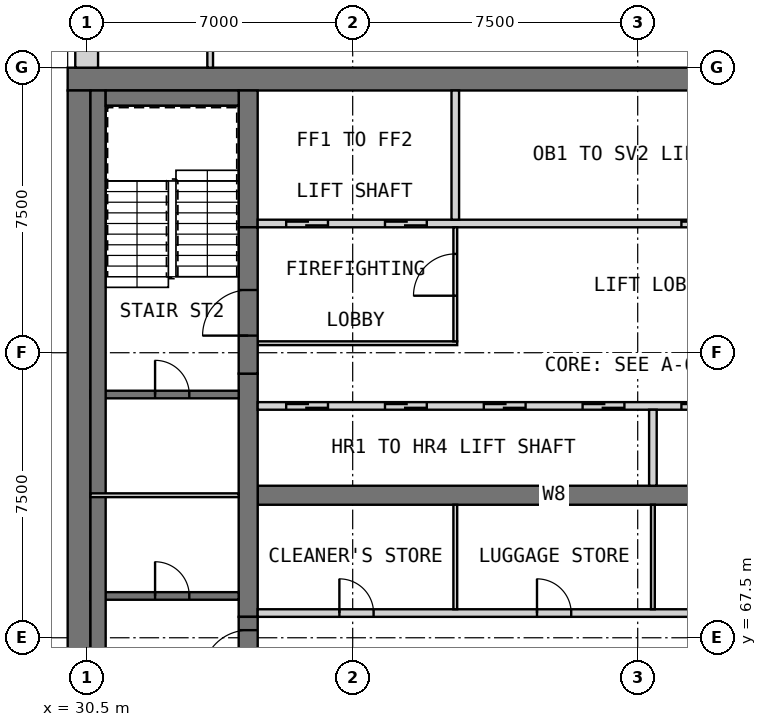
"""IFC4 building model, lengths in metres.
Left out: names, types, materials, properties, quantities, classifications, styles, units other than length and angle.
Written with IfcOpenShell. Run it as: python <this file> out.ifc"""

import sys

from ifc_helpers import new_model, si_unit, direction, frame, frame_2d, origin, place, context, subcontext, project, spatial, rectangle, extrude, element, fill, save


model = new_model("IFC4")
c1 = context("Model", 3, precision=1e-05, world=origin(), true_north=direction((0.0, 1.0)))
c2 = subcontext(c1, "Body", "Model", "MODEL_VIEW")
j1 = project(units=[si_unit("LENGTHUNIT", "METRE"), si_unit("PLANEANGLEUNIT", "RADIAN")], contexts=[c1])
p1 = place(None, origin())
s1 = spatial("IfcSite", under=j1, at=p1, CompositionType="ELEMENT")
p2 = place(p1, origin())
s2 = spatial("IfcBuilding", under=s1, at=p2, CompositionType="ELEMENT")
p3 = place(p2, frame((0.0, 0.0, 254.7)))
s3 = spatial("IfcBuildingStorey", under=s2, at=p3, CompositionType="ELEMENT", Elevation=254.7)
p4 = place(p3, frame((30.0, 82.2, 0.0), z_axis=(0.0, 0.0, 1.0), x_axis=(1.0, 0.0, 0.0)))
e1 = element("IfcWall", 1, at=p4, inside=s3, PredefinedType="SHEAR", context=c2, shape_type="SweptSolid", body=[
    extrude(rectangle(XDim=30.0, YDim=0.6, at=frame_2d((15.0, 0.0))), origin(), (0.0, 0.0, 1.0), 3.5),
])
p5 = place(p3, frame((30.3, 60.6, 0.0), z_axis=(0.0, 0.0, 1.0), x_axis=(0.0, 1.0, 0.0)))
e2 = element("IfcWall", 2, at=p5, inside=s3, PredefinedType="SHEAR", context=c2, shape_type="SweptSolid", body=[
    extrude(rectangle(XDim=21.3, YDim=0.6, at=frame_2d((10.65, 0.0))), origin(), (0.0, 0.0, 1.0), 3.5),
])
p6 = place(p3, frame((35.0, 71.25, 0.0), z_axis=(0.0, 0.0, 1.0), x_axis=(1.0, 0.0, 0.0)))
e3 = element("IfcWall", 3, at=p6, inside=s3, PredefinedType="SHEAR", context=c2, shape_type="SweptSolid", body=[
    extrude(rectangle(XDim=15.6, YDim=0.5, at=frame_2d((7.8, 0.0))), origin(), (0.0, 0.0, 1.0), 3.5),
])
p7 = place(p3, frame((34.75, 68.05, 0.0), z_axis=(0.0, 0.0, 1.0), x_axis=(0.0, 1.0, 0.0)))
e4 = element("IfcWall", 4, at=p7, inside=s3, PredefinedType="SHEAR", context=c2, shape_type="SweptSolid", body=[
    extrude(rectangle(XDim=6.4, YDim=0.5, at=frame_2d((3.2, 0.0))), origin(), (0.0, 0.0, 1.0), 3.5),
])
p8 = place(p3, frame((34.75, 78.3, 0.0), z_axis=(0.0, 0.0, 1.0), x_axis=(0.0, 1.0, 0.0)))
e5 = element("IfcWall", 5, at=p8, inside=s3, PredefinedType="SHEAR", context=c2, shape_type="SweptSolid", body=[
    extrude(rectangle(XDim=3.6, YDim=0.5, at=frame_2d((1.8, 0.0))), origin(), (0.0, 0.0, 1.0), 3.5),
])
p9 = place(p2, frame((0.0, 0.0, 34.0)))
s4 = spatial("IfcBuildingStorey", under=s2, at=p9, CompositionType="ELEMENT", Elevation=34.0)
for number, where, z_axis, x_axis in (
    (6, (29.7, 70.8, 0.0), (0.0, 0.0, 1.0), (0.0, 1.0, 0.0)),
    (7, (29.7, 75.675, 0.0), (0.0, 0.0, 1.0), (0.0, 1.0, 0.0)),
    (8, (29.7, 80.55, 0.0), (0.0, 0.0, 1.0), (0.0, 1.0, 0.0)),
):
    element("IfcWall", number, at=place(p9, frame(where, z_axis=z_axis, x_axis=x_axis)), inside=s4, PredefinedType="SOLIDWALL", context=c2, shape_type="SweptSolid", body=[
        extrude(rectangle(XDim=0.9, YDim=0.6, at=frame_2d((0.45, 0.0))), origin(), (0.0, 0.0, 1.0), 286.2),
    ])
p10 = place(p3, frame((30.5, 89.5, 0.0), z_axis=(0.0, 0.0, 1.0), x_axis=(0.0, -1.0, 0.0)))
e9 = element("IfcWall", 9, at=p10, inside=s3, PredefinedType="SOLIDWALL", context=c2, shape_type="SweptSolid", body=[
    extrude(rectangle(XDim=7.0, YDim=0.6, at=frame_2d((3.5, 0.0))), origin(), (0.0, 0.0, 1.0), 3.1),
])
p11 = place(p10, frame((3.925, 0.0, 0.8)))
e10 = element("IfcOpeningElement", 10, at=p11, cuts=e9, PredefinedType="OPENING", context=c2, shape_type="SweptSolid", body=[
    extrude(rectangle(XDim=2.4, YDim=1.8, at=frame_2d((1.2, 0.9))), frame((0.0, 0.31, 0.0), z_axis=(0.0, -1.0, 0.0), x_axis=(1.0, 0.0, 0.0)), (0.0, 0.0, 1.0), 0.62),
])
p12 = place(p10, frame((0.425, 0.0, 0.8)))
e11 = element("IfcOpeningElement", 11, at=p12, cuts=e9, PredefinedType="OPENING", context=c2, shape_type="SweptSolid", body=[
    extrude(rectangle(XDim=2.4, YDim=1.8, at=frame_2d((1.2, 0.9))), frame((0.0, 0.31, 0.0), z_axis=(0.0, -1.0, 0.0), x_axis=(1.0, 0.0, 0.0)), (0.0, 0.0, 1.0), 0.62),
])
p13 = place(p3, frame((35.0, 68.15, 0.0), z_axis=(0.0, 0.0, 1.0), x_axis=(1.0, 0.0, 0.0)))
e12 = element("IfcWall", 12, at=p13, inside=s3, PredefinedType="PARTITIONING", context=c2, shape_type="SweptSolid", body=[
    extrude(rectangle(XDim=15.6, YDim=0.2, at=frame_2d((7.8, 0.0))), origin(), (0.0, 0.0, 1.0), 3.09),
])
p14 = place(p13, frame((2.15, 0.0, 0.0)))
e13 = element("IfcOpeningElement", 13, at=p14, cuts=e12, PredefinedType="OPENING", context=c2, shape_type="SweptSolid", body=[
    extrude(rectangle(XDim=0.9, YDim=2.1, at=frame_2d((0.45, 1.05))), frame((0.0, 0.11, 0.0), z_axis=(0.0, -1.0, 0.0), x_axis=(1.0, 0.0, 0.0)), (0.0, 0.0, 1.0), 0.22),
])
p15 = place(p13, frame((7.35, 0.0, 0.0)))
e14 = element("IfcOpeningElement", 14, at=p15, cuts=e12, PredefinedType="OPENING", context=c2, shape_type="SweptSolid", body=[
    extrude(rectangle(XDim=0.9, YDim=2.1, at=frame_2d((0.45, 1.05))), frame((0.0, 0.11, 0.0), z_axis=(0.0, -1.0, 0.0), x_axis=(1.0, 0.0, 0.0)), (0.0, 0.0, 1.0), 0.22),
])
p16 = place(p13, frame((12.55, 0.0, 0.0)))
e15 = element("IfcOpeningElement", 15, at=p16, cuts=e12, PredefinedType="OPENING", context=c2, shape_type="SweptSolid", body=[
    extrude(rectangle(XDim=0.9, YDim=2.1, at=frame_2d((0.45, 1.05))), frame((0.0, 0.11, 0.0), z_axis=(0.0, -1.0, 0.0), x_axis=(1.0, 0.0, 0.0)), (0.0, 0.0, 1.0), 0.22),
])
for number, where, z_axis, x_axis in (
    (16, (40.2, 68.25, 0.0), (0.0, 0.0, 1.0), (0.0, 1.0, 0.0)),
    (17, (45.4, 68.25, 0.0), (0.0, 0.0, 1.0), (0.0, 1.0, 0.0)),
):
    element("IfcWall", number, at=place(p3, frame(where, z_axis=z_axis, x_axis=x_axis)), inside=s3, PredefinedType="PARTITIONING", context=c2, shape_type="SweptSolid", body=[
        extrude(rectangle(XDim=2.75, YDim=0.1, at=frame_2d((1.375, 0.0))), origin(), (0.0, 0.0, 1.0), 3.09),
    ])
p17 = place(p3, frame((35.0, 73.6, 0.0), z_axis=(0.0, 0.0, 1.0), x_axis=(1.0, 0.0, 0.0)))
e18 = element("IfcWall", 18, at=p17, inside=s3, PredefinedType="SOLIDWALL", context=c2, shape_type="SweptSolid", body=[
    extrude(rectangle(XDim=15.6, YDim=0.2, at=frame_2d((7.8, 0.0))), origin(), (0.0, 0.0, 1.0), 3.5),
])
p18 = place(p17, frame((0.75, 0.0, 0.0)))
e19 = element("IfcOpeningElement", 19, at=p18, cuts=e18, PredefinedType="OPENING", context=c2, shape_type="SweptSolid", body=[
    extrude(rectangle(XDim=1.1, YDim=2.1, at=frame_2d((0.55, 1.05))), frame((0.0, 0.11, 0.0), z_axis=(0.0, -1.0, 0.0), x_axis=(1.0, 0.0, 0.0)), (0.0, 0.0, 1.0), 0.22),
])
p19 = place(p17, frame((3.35, 0.0, 0.0)))
e20 = element("IfcOpeningElement", 20, at=p19, cuts=e18, PredefinedType="OPENING", context=c2, shape_type="SweptSolid", body=[
    extrude(rectangle(XDim=1.1, YDim=2.1, at=frame_2d((0.55, 1.05))), frame((0.0, 0.11, 0.0), z_axis=(0.0, -1.0, 0.0), x_axis=(1.0, 0.0, 0.0)), (0.0, 0.0, 1.0), 0.22),
])
p20 = place(p17, frame((5.95, 0.0, 0.0)))
e21 = element("IfcOpeningElement", 21, at=p20, cuts=e18, PredefinedType="OPENING", context=c2, shape_type="SweptSolid", body=[
    extrude(rectangle(XDim=1.1, YDim=2.1, at=frame_2d((0.55, 1.05))), frame((0.0, 0.11, 0.0), z_axis=(0.0, -1.0, 0.0), x_axis=(1.0, 0.0, 0.0)), (0.0, 0.0, 1.0), 0.22),
])
p21 = place(p17, frame((8.55, 0.0, 0.0)))
e22 = element("IfcOpeningElement", 22, at=p21, cuts=e18, PredefinedType="OPENING", context=c2, shape_type="SweptSolid", body=[
    extrude(rectangle(XDim=1.1, YDim=2.1, at=frame_2d((0.55, 1.05))), frame((0.0, 0.11, 0.0), z_axis=(0.0, -1.0, 0.0), x_axis=(1.0, 0.0, 0.0)), (0.0, 0.0, 1.0), 0.22),
])
p22 = place(p17, frame((11.15, 0.0, 0.0)))
e23 = element("IfcOpeningElement", 23, at=p22, cuts=e18, PredefinedType="OPENING", context=c2, shape_type="SweptSolid", body=[
    extrude(rectangle(XDim=1.1, YDim=2.1, at=frame_2d((0.55, 1.05))), frame((0.0, 0.11, 0.0), z_axis=(0.0, -1.0, 0.0), x_axis=(1.0, 0.0, 0.0)), (0.0, 0.0, 1.0), 0.22),
])
p23 = place(p17, frame((13.75, 0.0, 0.0)))
e24 = element("IfcOpeningElement", 24, at=p23, cuts=e18, PredefinedType="OPENING", context=c2, shape_type="SweptSolid", body=[
    extrude(rectangle(XDim=1.1, YDim=2.1, at=frame_2d((0.55, 1.05))), frame((0.0, 0.11, 0.0), z_axis=(0.0, -1.0, 0.0), x_axis=(1.0, 0.0, 0.0)), (0.0, 0.0, 1.0), 0.22),
])
p24 = place(p3, frame((45.4, 71.5, 0.0), z_axis=(0.0, 0.0, 1.0), x_axis=(0.0, 1.0, 0.0)))
e25 = element("IfcWall", 25, at=p24, inside=s3, PredefinedType="SOLIDWALL", context=c2, shape_type="SweptSolid", body=[
    extrude(rectangle(XDim=2.0, YDim=0.2, at=frame_2d((1.0, 0.0))), origin(), (0.0, 0.0, 1.0), 3.5),
])
p25 = place(p3, frame((35.0, 78.4, 0.0), z_axis=(0.0, 0.0, 1.0), x_axis=(1.0, 0.0, 0.0)))
e26 = element("IfcWall", 26, at=p25, inside=s3, PredefinedType="SOLIDWALL", context=c2, shape_type="SweptSolid", body=[
    extrude(rectangle(XDim=15.6, YDim=0.2, at=frame_2d((7.8, 0.0))), origin(), (0.0, 0.0, 1.0), 3.5),
])
p26 = place(p25, frame((0.75, 0.0, 0.0)))
e27 = element("IfcOpeningElement", 27, at=p26, cuts=e26, PredefinedType="OPENING", context=c2, shape_type="SweptSolid", body=[
    extrude(rectangle(XDim=1.1, YDim=2.1, at=frame_2d((0.55, 1.05))), frame((0.0, 0.11, 0.0), z_axis=(0.0, -1.0, 0.0), x_axis=(1.0, 0.0, 0.0)), (0.0, 0.0, 1.0), 0.22),
])
p27 = place(p25, frame((3.35, 0.0, 0.0)))
e28 = element("IfcOpeningElement", 28, at=p27, cuts=e26, PredefinedType="OPENING", context=c2, shape_type="SweptSolid", body=[
    extrude(rectangle(XDim=1.1, YDim=2.1, at=frame_2d((0.55, 1.05))), frame((0.0, 0.11, 0.0), z_axis=(0.0, -1.0, 0.0), x_axis=(1.0, 0.0, 0.0)), (0.0, 0.0, 1.0), 0.22),
])
p28 = place(p25, frame((11.15, 0.0, 0.0)))
e29 = element("IfcOpeningElement", 29, at=p28, cuts=e26, PredefinedType="OPENING", context=c2, shape_type="SweptSolid", body=[
    extrude(rectangle(XDim=1.1, YDim=2.1, at=frame_2d((0.55, 1.05))), frame((0.0, 0.11, 0.0), z_axis=(0.0, -1.0, 0.0), x_axis=(1.0, 0.0, 0.0)), (0.0, 0.0, 1.0), 0.22),
])
p29 = place(p25, frame((13.75, 0.0, 0.0)))
e30 = element("IfcOpeningElement", 30, at=p29, cuts=e26, PredefinedType="OPENING", context=c2, shape_type="SweptSolid", body=[
    extrude(rectangle(XDim=1.1, YDim=2.1, at=frame_2d((0.55, 1.05))), frame((0.0, 0.11, 0.0), z_axis=(0.0, -1.0, 0.0), x_axis=(1.0, 0.0, 0.0)), (0.0, 0.0, 1.0), 0.22),
])
p30 = place(p3, frame((40.2, 78.5, 0.0), z_axis=(0.0, 0.0, 1.0), x_axis=(0.0, 1.0, 0.0)))
e31 = element("IfcWall", 31, at=p30, inside=s3, PredefinedType="SOLIDWALL", context=c2, shape_type="SweptSolid", body=[
    extrude(rectangle(XDim=3.4, YDim=0.2, at=frame_2d((1.7, 0.0))), origin(), (0.0, 0.0, 1.0), 3.5),
])
p31 = place(p3, frame((35.0, 75.25, 0.0), z_axis=(0.0, 0.0, 1.0), x_axis=(1.0, 0.0, 0.0)))
e32 = element("IfcWall", 32, at=p31, inside=s3, PredefinedType="PARTITIONING", context=c2, shape_type="SweptSolid", body=[
    extrude(rectangle(XDim=5.25, YDim=0.1, at=frame_2d((2.625, 0.0))), origin(), (0.0, 0.0, 1.0), 3.09),
])
p32 = place(p3, frame((40.2, 75.3, 0.0), z_axis=(0.0, 0.0, 1.0), x_axis=(0.0, 1.0, 0.0)))
e33 = element("IfcWall", 33, at=p32, inside=s3, PredefinedType="PARTITIONING", context=c2, shape_type="SweptSolid", body=[
    extrude(rectangle(XDim=3.0, YDim=0.1, at=frame_2d((1.5, 0.0))), origin(), (0.0, 0.0, 1.0), 3.09),
])
p33 = place(p32, frame((1.2, 0.0, 0.0)))
e34 = element("IfcOpeningElement", 34, at=p33, cuts=e33, PredefinedType="OPENING", context=c2, shape_type="SweptSolid", body=[
    extrude(rectangle(XDim=1.1, YDim=2.1, at=frame_2d((0.55, 1.05))), frame((0.0, 0.06, 0.0), z_axis=(0.0, -1.0, 0.0), x_axis=(1.0, 0.0, 0.0)), (0.0, 0.0, 1.0), 0.12),
])
p34 = place(p3, frame((34.75, 64.2, 0.0), z_axis=(0.0, 0.0, 1.0), x_axis=(0.0, 1.0, 0.0)))
e35 = element("IfcWall", 35, at=p34, inside=s3, PredefinedType="SOLIDWALL", context=c2, shape_type="SweptSolid", body=[
    extrude(rectangle(XDim=3.85, YDim=0.5, at=frame_2d((1.925, 0.0))), origin(), (0.0, 0.0, 1.0), 2.3),
])
p35 = place(p34, frame((2.3, 0.0, 0.0)))
e36 = element("IfcOpeningElement", 36, at=p35, cuts=e35, PredefinedType="OPENING", context=c2, shape_type="SweptSolid", body=[
    extrude(rectangle(XDim=1.2, YDim=2.1, at=frame_2d((0.6, 1.05))), frame((0.0, 0.26, 0.0), z_axis=(0.0, -1.0, 0.0), x_axis=(1.0, 0.0, 0.0)), (0.0, 0.0, 1.0), 0.52),
])
p36 = place(p3, frame((34.75, 74.45, 0.0), z_axis=(0.0, 0.0, 1.0), x_axis=(0.0, 1.0, 0.0)))
e37 = element("IfcWall", 37, at=p36, inside=s3, PredefinedType="SOLIDWALL", context=c2, shape_type="SweptSolid", body=[
    extrude(rectangle(XDim=3.85, YDim=0.5, at=frame_2d((1.925, 0.0))), origin(), (0.0, 0.0, 1.0), 2.3),
])
p37 = place(p36, frame((1.0, 0.0, 0.0)))
e38 = element("IfcOpeningElement", 38, at=p37, cuts=e37, PredefinedType="OPENING", context=c2, shape_type="SweptSolid", body=[
    extrude(rectangle(XDim=1.2, YDim=2.1, at=frame_2d((0.6, 1.05))), frame((0.0, 0.26, 0.0), z_axis=(0.0, -1.0, 0.0), x_axis=(1.0, 0.0, 0.0)), (0.0, 0.0, 1.0), 0.52),
])
p38 = place(p3, frame((30.6, 68.6, 0.0), z_axis=(0.0, 0.0, 1.0), x_axis=(1.0, 0.0, 0.0)))
e39 = element("IfcWall", 39, at=p38, inside=s3, PredefinedType="SOLIDWALL", context=c2, shape_type="SweptSolid", body=[
    extrude(rectangle(XDim=3.9, YDim=0.2, at=frame_2d((1.95, 0.0))), origin(), (0.0, 0.0, 1.0), 3.09),
])
p39 = place(p38, frame((1.7, 0.0, 0.0)))
e40 = element("IfcOpeningElement", 40, at=p39, cuts=e39, PredefinedType="OPENING", context=c2, shape_type="SweptSolid", body=[
    extrude(rectangle(XDim=0.9, YDim=2.1, at=frame_2d((0.45, 1.05))), frame((0.0, 0.11, 0.0), z_axis=(0.0, -1.0, 0.0), x_axis=(1.0, 0.0, 0.0)), (0.0, 0.0, 1.0), 0.22),
])
p40 = place(p3, frame((30.6, 73.9, 0.0), z_axis=(0.0, 0.0, 1.0), x_axis=(1.0, 0.0, 0.0)))
e41 = element("IfcWall", 41, at=p40, inside=s3, PredefinedType="SOLIDWALL", context=c2, shape_type="SweptSolid", body=[
    extrude(rectangle(XDim=3.9, YDim=0.2, at=frame_2d((1.95, 0.0))), origin(), (0.0, 0.0, 1.0), 3.09),
])
p41 = place(p40, frame((1.7, 0.0, 0.0)))
e42 = element("IfcOpeningElement", 42, at=p41, cuts=e41, PredefinedType="OPENING", context=c2, shape_type="SweptSolid", body=[
    extrude(rectangle(XDim=0.9, YDim=2.1, at=frame_2d((0.45, 1.05))), frame((0.0, 0.11, 0.0), z_axis=(0.0, -1.0, 0.0), x_axis=(1.0, 0.0, 0.0)), (0.0, 0.0, 1.0), 0.22),
])
p42 = place(p3, frame((30.8, 60.6, 0.0), z_axis=(0.0, 0.0, 1.0), x_axis=(0.0, 1.0, 0.0)))
e43 = element("IfcWall", 43, at=p42, inside=s3, PredefinedType="SOLIDWALL", context=c2, shape_type="SweptSolid", body=[
    extrude(rectangle(XDim=21.3, YDim=0.4, at=frame_2d((10.65, 0.0))), origin(), (0.0, 0.0, 1.0), 3.09),
])
p43 = place(p3, frame((31.0, 81.7, 0.0), z_axis=(0.0, 0.0, 1.0), x_axis=(1.0, 0.0, 0.0)))
e44 = element("IfcWall", 44, at=p43, inside=s3, PredefinedType="SOLIDWALL", context=c2, shape_type="SweptSolid", body=[
    extrude(rectangle(XDim=3.5, YDim=0.4, at=frame_2d((1.75, 0.0))), origin(), (0.0, 0.0, 1.0), 3.09),
])
p44 = place(p3, frame((30.6, 71.25, 0.0), z_axis=(0.0, 0.0, 1.0), x_axis=(1.0, 0.0, 0.0)))
e45 = element("IfcWall", 45, at=p44, inside=s3, PredefinedType="PARTITIONING", context=c2, shape_type="SweptSolid", body=[
    extrude(rectangle(XDim=3.9, YDim=0.1, at=frame_2d((1.95, 0.0))), origin(), (0.0, 0.0, 1.0), 3.09),
])
p45 = place(p3, frame((33.75, 82.5, 0.0), z_axis=(0.0, 0.0, 1.0), x_axis=(0.0, 1.0, 0.0)))
e46 = element("IfcWall", 46, at=p45, inside=s3, PredefinedType="PARTITIONING", context=c2, shape_type="SweptSolid", body=[
    extrude(rectangle(XDim=1.725, YDim=0.15, at=frame_2d((0.863, 0.0))), origin(), (0.0, 0.0, 1.0), 3.1),
])
p46 = place(p45, frame((0.45, 0.0, 0.0)))
e47 = element("IfcOpeningElement", 47, at=p46, cuts=e46, PredefinedType="OPENING", context=c2, shape_type="SweptSolid", body=[
    extrude(rectangle(XDim=0.9, YDim=2.1, at=frame_2d((0.45, 1.05))), frame((0.0, 0.085, 0.0), z_axis=(0.0, -1.0, 0.0), x_axis=(1.0, 0.0, 0.0)), (0.0, 0.0, 1.0), 0.17),
])
p47 = place(p14, origin())
e48 = element("IfcDoor", 48, at=p47, inside=s3, OperationType="SINGLE_SWING_RIGHT", PredefinedType="DOOR", context=c2, shape_type="SweptSolid", body=[
    extrude(rectangle(XDim=0.9, YDim=2.1, at=frame_2d((0.45, 1.05))), frame((0.0, 0.025, 0.0), z_axis=(0.0, -1.0, 0.0), x_axis=(1.0, 0.0, 0.0)), (0.0, 0.0, 1.0), 0.05),
])
fill(e13, e48)
p48 = place(p15, origin())
e49 = element("IfcDoor", 49, at=p48, inside=s3, OperationType="SINGLE_SWING_LEFT", PredefinedType="DOOR", context=c2, shape_type="SweptSolid", body=[
    extrude(rectangle(XDim=0.9, YDim=2.1, at=frame_2d((0.45, 1.05))), frame((0.0, 0.025, 0.0), z_axis=(0.0, -1.0, 0.0), x_axis=(1.0, 0.0, 0.0)), (0.0, 0.0, 1.0), 0.05),
])
fill(e14, e49)
p49 = place(p18, origin())
e50 = element("IfcDoor", 50, at=p49, inside=s3, OperationType="DOUBLE_DOOR_SLIDING", PredefinedType="DOOR", context=c2, shape_type="SweptSolid", body=[
    extrude(rectangle(XDim=1.1, YDim=2.1, at=frame_2d((0.55, 1.05))), frame((0.0, 0.025, 0.0), z_axis=(0.0, -1.0, 0.0), x_axis=(1.0, 0.0, 0.0)), (0.0, 0.0, 1.0), 0.05),
])
fill(e19, e50)
p50 = place(p19, origin())
e51 = element("IfcDoor", 51, at=p50, inside=s3, OperationType="DOUBLE_DOOR_SLIDING", PredefinedType="DOOR", context=c2, shape_type="SweptSolid", body=[
    extrude(rectangle(XDim=1.1, YDim=2.1, at=frame_2d((0.55, 1.05))), frame((0.0, 0.025, 0.0), z_axis=(0.0, -1.0, 0.0), x_axis=(1.0, 0.0, 0.0)), (0.0, 0.0, 1.0), 0.05),
])
fill(e20, e51)
p51 = place(p20, origin())
e52 = element("IfcDoor", 52, at=p51, inside=s3, OperationType="DOUBLE_DOOR_SLIDING", PredefinedType="DOOR", context=c2, shape_type="SweptSolid", body=[
    extrude(rectangle(XDim=1.1, YDim=2.1, at=frame_2d((0.55, 1.05))), frame((0.0, 0.025, 0.0), z_axis=(0.0, -1.0, 0.0), x_axis=(1.0, 0.0, 0.0)), (0.0, 0.0, 1.0), 0.05),
])
fill(e21, e52)
p52 = place(p21, origin())
e53 = element("IfcDoor", 53, at=p52, inside=s3, OperationType="DOUBLE_DOOR_SLIDING", PredefinedType="DOOR", context=c2, shape_type="SweptSolid", body=[
    extrude(rectangle(XDim=1.1, YDim=2.1, at=frame_2d((0.55, 1.05))), frame((0.0, 0.025, 0.0), z_axis=(0.0, -1.0, 0.0), x_axis=(1.0, 0.0, 0.0)), (0.0, 0.0, 1.0), 0.05),
])
fill(e22, e53)
p53 = place(p22, origin())
e54 = element("IfcDoor", 54, at=p53, inside=s3, OperationType="DOUBLE_DOOR_SLIDING", PredefinedType="DOOR", context=c2, shape_type="SweptSolid", body=[
    extrude(rectangle(XDim=1.1, YDim=2.1, at=frame_2d((0.55, 1.05))), frame((0.0, 0.025, 0.0), z_axis=(0.0, -1.0, 0.0), x_axis=(1.0, 0.0, 0.0)), (0.0, 0.0, 1.0), 0.05),
])
fill(e23, e54)
p54 = place(p26, origin())
e55 = element("IfcDoor", 55, at=p54, inside=s3, OperationType="DOUBLE_DOOR_SLIDING", PredefinedType="DOOR", context=c2, shape_type="SweptSolid", body=[
    extrude(rectangle(XDim=1.1, YDim=2.1, at=frame_2d((0.55, 1.05))), frame((0.0, 0.025, 0.0), z_axis=(0.0, -1.0, 0.0), x_axis=(1.0, 0.0, 0.0)), (0.0, 0.0, 1.0), 0.05),
])
fill(e27, e55)
p55 = place(p27, origin())
e56 = element("IfcDoor", 56, at=p55, inside=s3, OperationType="DOUBLE_DOOR_SLIDING", PredefinedType="DOOR", context=c2, shape_type="SweptSolid", body=[
    extrude(rectangle(XDim=1.1, YDim=2.1, at=frame_2d((0.55, 1.05))), frame((0.0, 0.025, 0.0), z_axis=(0.0, -1.0, 0.0), x_axis=(1.0, 0.0, 0.0)), (0.0, 0.0, 1.0), 0.05),
])
fill(e28, e56)
p56 = place(p28, origin())
e57 = element("IfcDoor", 57, at=p56, inside=s3, OperationType="DOUBLE_DOOR_SLIDING", PredefinedType="DOOR", context=c2, shape_type="SweptSolid", body=[
    extrude(rectangle(XDim=1.1, YDim=2.1, at=frame_2d((0.55, 1.05))), frame((0.0, 0.025, 0.0), z_axis=(0.0, -1.0, 0.0), x_axis=(1.0, 0.0, 0.0)), (0.0, 0.0, 1.0), 0.05),
])
fill(e29, e57)
p57 = place(p33, origin())
e58 = element("IfcDoor", 58, at=p57, inside=s3, OperationType="SINGLE_SWING_LEFT", PredefinedType="DOOR", context=c2, shape_type="SweptSolid", body=[
    extrude(rectangle(XDim=1.1, YDim=2.1, at=frame_2d((0.55, 1.05))), frame((0.0, 0.025, 0.0), z_axis=(0.0, -1.0, 0.0), x_axis=(1.0, 0.0, 0.0)), (0.0, 0.0, 1.0), 0.05),
])
fill(e34, e58)
p58 = place(p35, origin())
e59 = element("IfcDoor", 59, at=p58, inside=s3, OperationType="SINGLE_SWING_LEFT", PredefinedType="DOOR", context=c2, shape_type="SweptSolid", body=[
    extrude(rectangle(XDim=1.2, YDim=2.1, at=frame_2d((0.6, 1.05))), frame((0.0, 0.025, 0.0), z_axis=(0.0, -1.0, 0.0), x_axis=(1.0, 0.0, 0.0)), (0.0, 0.0, 1.0), 0.05),
])
fill(e36, e59)
p59 = place(p37, origin())
e60 = element("IfcDoor", 60, at=p59, inside=s3, OperationType="SINGLE_SWING_RIGHT", PredefinedType="DOOR", context=c2, shape_type="SweptSolid", body=[
    extrude(rectangle(XDim=1.2, YDim=2.1, at=frame_2d((0.6, 1.05))), frame((0.0, 0.025, 0.0), z_axis=(0.0, -1.0, 0.0), x_axis=(1.0, 0.0, 0.0)), (0.0, 0.0, 1.0), 0.05),
])
fill(e38, e60)
p60 = place(p39, origin())
e61 = element("IfcDoor", 61, at=p60, inside=s3, OperationType="SINGLE_SWING_LEFT", PredefinedType="DOOR", context=c2, shape_type="SweptSolid", body=[
    extrude(rectangle(XDim=0.9, YDim=2.1, at=frame_2d((0.45, 1.05))), frame((0.0, 0.025, 0.0), z_axis=(0.0, -1.0, 0.0), x_axis=(1.0, 0.0, 0.0)), (0.0, 0.0, 1.0), 0.05),
])
fill(e40, e61)
p61 = place(p41, origin())
e62 = element("IfcDoor", 62, at=p61, inside=s3, OperationType="SINGLE_SWING_RIGHT", PredefinedType="DOOR", context=c2, shape_type="SweptSolid", body=[
    extrude(rectangle(XDim=0.9, YDim=2.1, at=frame_2d((0.45, 1.05))), frame((0.0, 0.025, 0.0), z_axis=(0.0, -1.0, 0.0), x_axis=(1.0, 0.0, 0.0)), (0.0, 0.0, 1.0), 0.05),
])
fill(e42, e62)
save(model, sys.argv[1])
